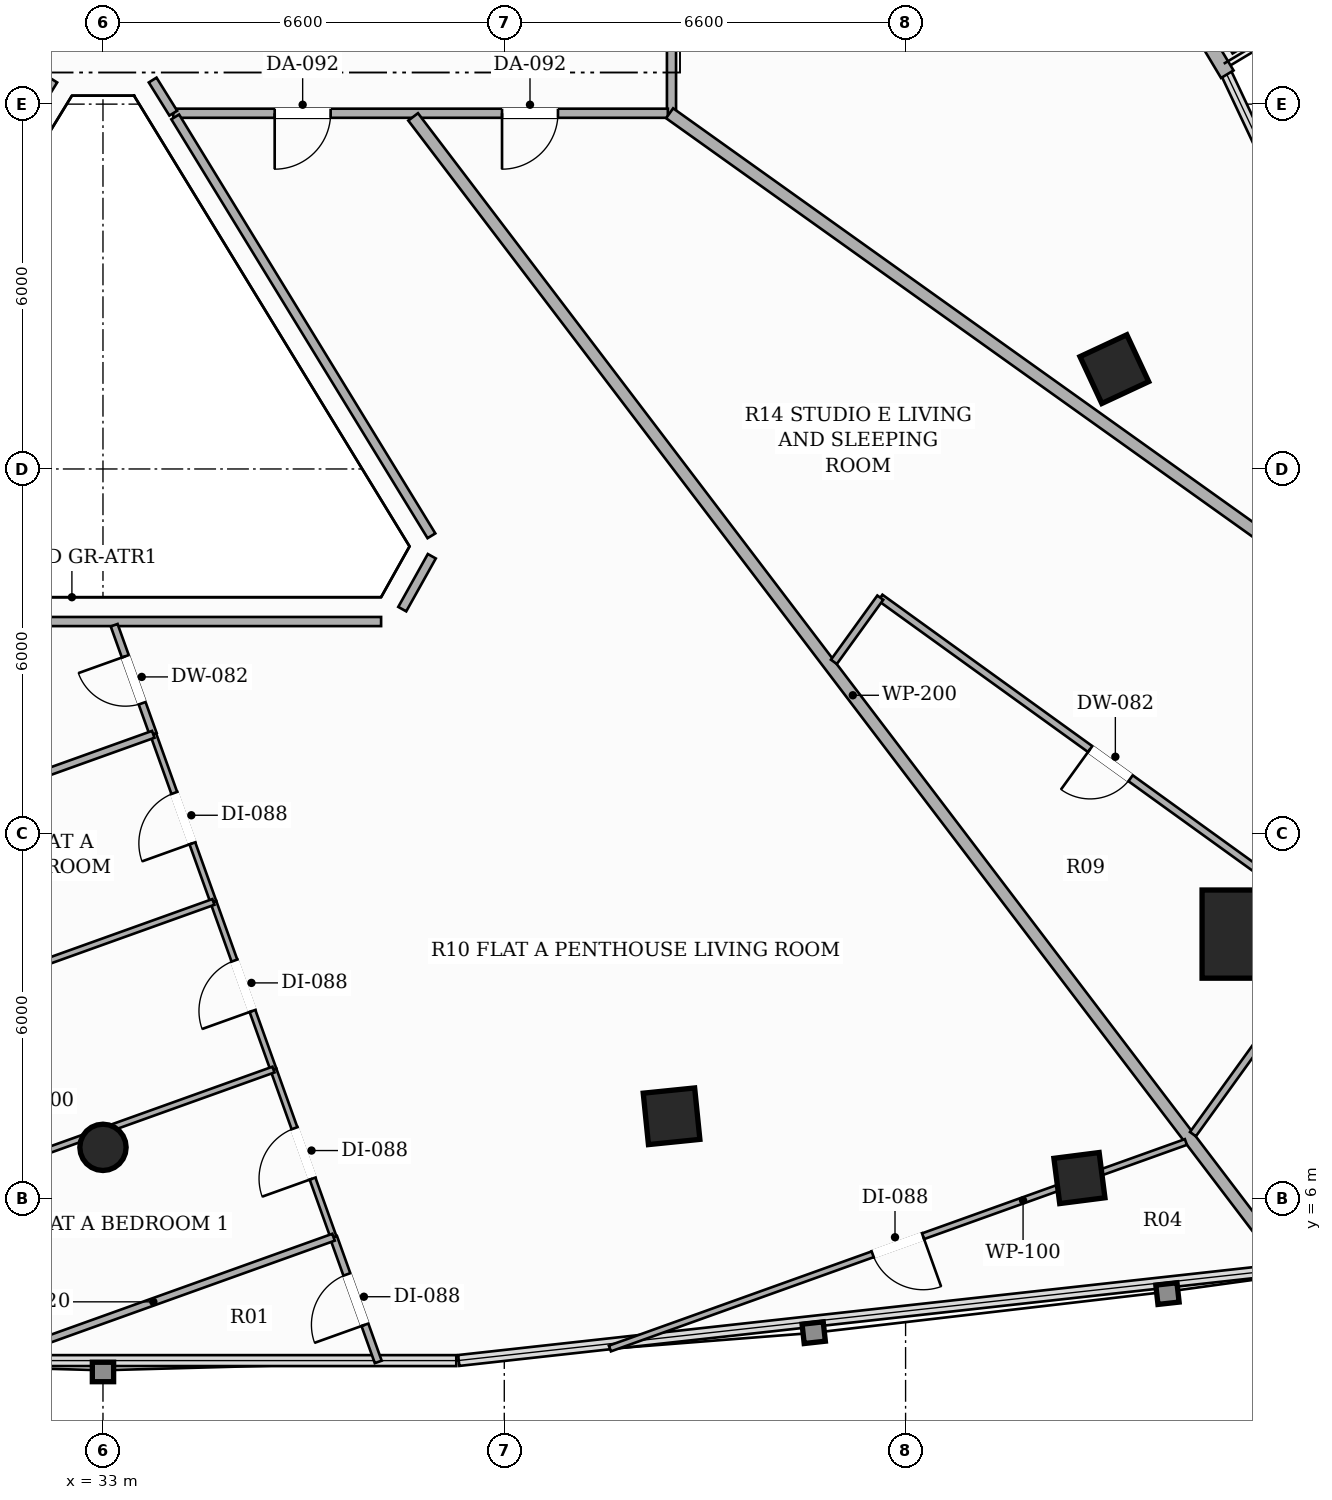
"""IFC4 building model, lengths in metres.
Left out: names, types, materials, properties, quantities, classifications, styles, units other than length and angle.
Written with IfcOpenShell. Run it as: python <this file> out.ifc"""

import sys

from ifc_helpers import new_model, si_unit, direction, frame, frame_2d, origin, origin_2d, place, context, subcontext, project, spatial, rectangle, hollow_rectangle, hollow_circle, extrude, element, fill, save


model = new_model("IFC4")
c1 = context("Model", 3, precision=1e-05, world=origin(), true_north=direction((0.0, 1.0)))
c2 = subcontext(c1, "Body", "Model", "MODEL_VIEW")
j1 = project(units=[si_unit("LENGTHUNIT", "METRE"), si_unit("PLANEANGLEUNIT", "RADIAN")], contexts=[c1])
p1 = place(None, origin())
s1 = spatial("IfcSite", under=j1, at=p1, CompositionType="ELEMENT")
p2 = place(p1, origin())
s2 = spatial("IfcBuilding", under=s1, at=p2, CompositionType="ELEMENT")
p3 = place(p2, frame((0.0, 0.0, 139.7)))
s3 = spatial("IfcBuildingStorey", under=s2, at=p3, CompositionType="ELEMENT", Elevation=139.7)
p4 = place(p3, frame((51.801, 10.351, 0.0), z_axis=(0.0, 0.0, 1.0), x_axis=(1.0, 0.0, 0.0)))
e1 = element("IfcColumn", 1, at=p4, inside=s3, PredefinedType="COLUMN", context=c2, shape_type="SweptSolid", body=[
    extrude(hollow_rectangle(XDim=1.45, YDim=1.45, WallThickness=0.045, at=origin_2d()), origin(), (0.0, 0.0, 1.0), 3.3),
])
p5 = place(p3, frame((33.0, 6.844, 0.0), z_axis=(0.0, 0.0, 1.0), x_axis=(1.0, 0.0, 0.0)))
e2 = element("IfcColumn", 2, at=p5, inside=s3, PredefinedType="COLUMN", context=c2, shape_type="SweptSolid", body=[
    extrude(hollow_circle(Radius=0.381, WallThickness=0.022, at=origin_2d()), origin(), (0.0, 0.0, 1.0), 3.3),
])
for number, where, z_axis, x_axis in (
    (3, (42.351, 7.355, 0.0), (0.0, 0.0, 1.0), (0.995, 0.101, 0.0)),
    (4, (49.633, 19.642, 0.0), (0.0, 0.0, 1.0), (-0.423, 0.906, 0.0)),
):
    element("IfcColumn", number, at=place(p3, frame(where, z_axis=z_axis, x_axis=x_axis)), inside=s3, PredefinedType="COLUMN", context=c2, shape_type="SweptSolid", body=[
        extrude(hollow_rectangle(XDim=0.85, YDim=0.85, WallThickness=0.028, at=origin_2d()), origin(), (0.0, 0.0, 1.0), 3.3),
    ])
p6 = place(p3, frame((49.059, 6.339, 0.0), z_axis=(0.0, 0.0, 1.0), x_axis=(0.99189444259, 0.127064608601, 0.0)))
e5 = element("IfcColumn", 5, at=p6, inside=s3, PredefinedType="COLUMN", context=c2, shape_type="SweptSolid", body=[
    extrude(hollow_rectangle(XDim=0.75, YDim=0.75, WallThickness=0.025, at=origin_2d()), origin(), (0.0, 0.0, 1.0), 3.3),
])
p7 = place(p3, frame((51.491, 24.492, 0.0), z_axis=(0.0, 0.0, 1.0), x_axis=(-0.514364263751, 0.857571807009, 0.0)))
e6 = element("IfcWall", 6, at=p7, inside=s3, PredefinedType="SOLIDWALL", context=c2, shape_type="SweptSolid", body=[
    extrude(rectangle(XDim=11.468, YDim=0.24, at=frame_2d((5.734, 0.0))), origin(), (0.0, 0.0, 1.0), 2.624),
])
p8 = place(p7, frame((8.972, 0.0, 0.0)))
e7 = element("IfcOpeningElement", 7, at=p8, cuts=e6, PredefinedType="OPENING", context=c2, shape_type="SweptSolid", body=[
    extrude(rectangle(XDim=1.8, YDim=2.2, at=frame_2d((0.9, 1.1))), frame((0.0, 0.13, 0.0), z_axis=(0.0, -1.0, 0.0), x_axis=(1.0, 0.0, 0.0)), (0.0, 0.0, 1.0), 0.26),
])
p9 = place(p3, frame((32.183, 24.396, 0.0), z_axis=(0.0, 0.0, 1.0), x_axis=(-0.527674894897, -0.849446411079, 0.0)))
e8 = element("IfcWall", 8, at=p9, inside=s3, PredefinedType="PARTITIONING", context=c2, shape_type="SweptSolid", body=[
    extrude(rectangle(XDim=0.643, YDim=0.15, at=frame_2d((0.321, 0.0))), origin(), (0.0, 0.0, 1.0), 3.06),
])
p10 = place(p3, frame((42.35, 28.34, 0.0), z_axis=(0.0, 0.0, 1.0), x_axis=(0.0, -1.0, 0.0)))
e9 = element("IfcWall", 9, at=p10, inside=s3, PredefinedType="PARTITIONING", context=c2, shape_type="SweptSolid", body=[
    extrude(rectangle(XDim=4.49, YDim=0.15, at=frame_2d((2.245, 0.0))), origin(), (0.0, 0.0, 1.0), 2.721),
])
p11 = place(p10, frame((1.805, 0.0, 0.0)))
e10 = element("IfcOpeningElement", 10, at=p11, cuts=e9, PredefinedType="OPENING", context=c2, shape_type="SweptSolid", body=[
    extrude(rectangle(XDim=0.88, YDim=2.1, at=frame_2d((0.44, 1.05))), frame((0.0, 0.085, 0.0), z_axis=(0.0, -1.0, 0.0), x_axis=(1.0, 0.0, 0.0)), (0.0, 0.0, 1.0), 0.17),
])
p12 = place(p3, frame((42.29, 23.85, 0.0), z_axis=(0.0, 0.0, 1.0), x_axis=(-1.0, 0.0, 0.0)))
e11 = element("IfcWall", 11, at=p12, inside=s3, PredefinedType="PARTITIONING", context=c2, shape_type="SweptSolid", body=[
    extrude(rectangle(XDim=8.134, YDim=0.15, at=frame_2d((4.067, 0.0))), origin(), (0.0, 0.0, 1.0), 2.492),
])
p13 = place(p12, frame((5.546, 0.0, 0.0)))
e12 = element("IfcOpeningElement", 12, at=p13, cuts=e11, PredefinedType="OPENING", context=c2, shape_type="SweptSolid", body=[
    extrude(rectangle(XDim=0.92, YDim=2.15, at=frame_2d((0.46, 1.075))), frame((0.0, 0.085, 0.0), z_axis=(0.0, -1.0, 0.0), x_axis=(1.0, 0.0, 0.0)), (0.0, 0.0, 1.0), 0.17),
])
p14 = place(p12, frame((1.807, 0.0, 0.0)))
e13 = element("IfcOpeningElement", 13, at=p14, cuts=e11, PredefinedType="OPENING", context=c2, shape_type="SweptSolid", body=[
    extrude(rectangle(XDim=0.92, YDim=2.15, at=frame_2d((0.46, 1.075))), frame((0.0, 0.085, 0.0), z_axis=(0.0, -1.0, 0.0), x_axis=(1.0, 0.0, 0.0)), (0.0, 0.0, 1.0), 0.17),
])
p15 = place(p3, frame((34.156, 23.851, 0.0), z_axis=(0.0, 0.0, 1.0), x_axis=(-0.528356729584, 0.849022476913, 0.0)))
e14 = element("IfcWall", 14, at=p15, inside=s3, PredefinedType="PARTITIONING", context=c2, shape_type="SweptSolid", body=[
    extrude(rectangle(XDim=0.642, YDim=0.15, at=frame_2d((0.321, 0.0))), origin(), (0.0, 0.0, 1.0), 3.06),
])
p16 = place(p3, frame((34.188, 23.79, 0.0), z_axis=(0.0, 0.0, 1.0), x_axis=(0.521816809014, -0.853057570057, 0.0)))
e15 = element("IfcWall", 15, at=p16, inside=s3, PredefinedType="PARTITIONING", context=c2, shape_type="SweptSolid", body=[
    extrude(rectangle(XDim=8.076, YDim=0.15, at=frame_2d((4.038, 0.0))), origin(), (0.0, 0.0, 1.0), 2.721),
])
p17 = place(p3, frame((38.408, 16.565, 0.0), z_axis=(0.0, 0.0, 1.0), x_axis=(-0.48761814532, -0.873057010942, 0.0)))
e16 = element("IfcWall", 16, at=p17, inside=s3, PredefinedType="PARTITIONING", context=c2, shape_type="SweptSolid", body=[
    extrude(rectangle(XDim=0.996, YDim=0.15, at=frame_2d((0.498, 0.0))), origin(), (0.0, 0.0, 1.0), 3.06),
])
p18 = place(p3, frame((37.574, 15.491, 0.0), z_axis=(0.0, 0.0, 1.0), x_axis=(-1.0, 0.0, 0.0)))
e17 = element("IfcWall", 17, at=p18, inside=s3, PredefinedType="PARTITIONING", context=c2, shape_type="SweptSolid", body=[
    extrude(rectangle(XDim=9.148, YDim=0.15, at=frame_2d((4.574, 0.0))), origin(), (0.0, 0.0, 1.0), 2.721),
])
p19 = place(p3, frame((38.101, 23.79, 0.0), z_axis=(0.0, 0.0, 1.0), x_axis=(0.605201904092, -0.796072016393, 0.0)))
e18 = element("IfcWall", 18, at=p19, inside=s3, PredefinedType="PARTITIONING", context=c2, shape_type="SweptSolid", body=[
    extrude(rectangle(XDim=23.896, YDim=0.2, at=frame_2d((11.948, 0.0))), origin(), (0.0, 0.0, 1.0), 2.413),
])
p20 = place(p3, frame((56.515, 13.72, 0.0), z_axis=(0.0, 0.0, 1.0), x_axis=(-0.813997291107, 0.580868668522, 0.0)))
e19 = element("IfcWall", 19, at=p20, inside=s3, PredefinedType="PARTITIONING", context=c2, shape_type="SweptSolid", body=[
    extrude(rectangle(XDim=17.44, YDim=0.2, at=frame_2d((8.72, 0.0))), origin(), (0.0, 0.0, 1.0), 2.413),
])
p21 = place(p3, frame((33.827, 13.636, 0.0), z_axis=(0.0, 0.0, 1.0), x_axis=(-0.337163686904, 0.941446041063, 0.0)))
e20 = element("IfcWall", 20, at=p21, inside=s3, PredefinedType="PARTITIONING", context=c2, shape_type="SweptSolid", body=[
    extrude(rectangle(XDim=1.906, YDim=0.12, at=frame_2d((0.953, 0.0))), origin(), (0.0, 0.0, 1.0), 2.721),
])
p22 = place(p21, frame((0.543, 0.0, 0.0)))
e21 = element("IfcOpeningElement", 21, at=p22, cuts=e20, PredefinedType="OPENING", context=c2, shape_type="SweptSolid", body=[
    extrude(rectangle(XDim=0.82, YDim=2.1, at=frame_2d((0.41, 1.05))), frame((0.0, 0.07, 0.0), z_axis=(0.0, -1.0, 0.0), x_axis=(1.0, 0.0, 0.0)), (0.0, 0.0, 1.0), 0.14),
])
p23 = place(p3, frame((37.527, 3.315, 0.0), z_axis=(0.0, 0.0, 1.0), x_axis=(-0.337393850622, 0.9413635799, 0.0)))
e22 = element("IfcWall", 22, at=p23, inside=s3, PredefinedType="PARTITIONING", context=c2, shape_type="SweptSolid", body=[
    extrude(rectangle(XDim=2.179, YDim=0.12, at=frame_2d((1.089, 0.0))), origin(), (0.0, 0.0, 1.0), 3.06),
])
p24 = place(p23, frame((0.649, 0.0, 0.0)))
e23 = element("IfcOpeningElement", 23, at=p24, cuts=e22, PredefinedType="OPENING", context=c2, shape_type="SweptSolid", body=[
    extrude(rectangle(XDim=0.88, YDim=2.1, at=frame_2d((0.44, 1.05))), frame((0.0, 0.07, 0.0), z_axis=(0.0, -1.0, 0.0), x_axis=(1.0, 0.0, 0.0)), (0.0, 0.0, 1.0), 0.14),
])
p25 = place(p3, frame((36.792, 5.366, 0.0), z_axis=(0.0, 0.0, 1.0), x_axis=(-0.33735537207, 0.941377370099, 0.0)))
e24 = element("IfcWall", 24, at=p25, inside=s3, PredefinedType="PARTITIONING", context=c2, shape_type="SweptSolid", body=[
    extrude(rectangle(XDim=2.929, YDim=0.1, at=frame_2d((1.464, 0.0))), origin(), (0.0, 0.0, 1.0), 2.413),
])
p26 = place(p25, frame((1.024, 0.0, 0.0)))
e25 = element("IfcOpeningElement", 25, at=p26, cuts=e24, PredefinedType="OPENING", context=c2, shape_type="SweptSolid", body=[
    extrude(rectangle(XDim=0.88, YDim=2.1, at=frame_2d((0.44, 1.05))), frame((0.0, 0.06, 0.0), z_axis=(0.0, -1.0, 0.0), x_axis=(1.0, 0.0, 0.0)), (0.0, 0.0, 1.0), 0.12),
])
p27 = place(p3, frame((50.81, 6.932, 0.0), z_axis=(0.0, 0.0, 1.0), x_axis=(-0.941340567411, -0.337458050943, 0.0)))
e26 = element("IfcWall", 26, at=p27, inside=s3, PredefinedType="PARTITIONING", context=c2, shape_type="SweptSolid", body=[
    extrude(rectangle(XDim=10.063, YDim=0.1, at=frame_2d((5.032, 0.0))), origin(), (0.0, 0.0, 1.0), 2.413),
])
p28 = place(p27, frame((4.592, 0.0, 0.0)))
e27 = element("IfcOpeningElement", 27, at=p28, cuts=e26, PredefinedType="OPENING", context=c2, shape_type="SweptSolid", body=[
    extrude(rectangle(XDim=0.88, YDim=2.1, at=frame_2d((0.44, 1.05))), frame((0.0, 0.06, 0.0), z_axis=(0.0, -1.0, 0.0), x_axis=(1.0, 0.0, 0.0)), (0.0, 0.0, 1.0), 0.12),
])
p29 = place(p3, frame((35.804, 8.123, 0.0), z_axis=(0.0, 0.0, 1.0), x_axis=(-0.337381847176, 0.941367881965, 0.0)))
e28 = element("IfcWall", 28, at=p29, inside=s3, PredefinedType="PARTITIONING", context=c2, shape_type="SweptSolid", body=[
    extrude(rectangle(XDim=2.928, YDim=0.1, at=frame_2d((1.464, 0.0))), origin(), (0.0, 0.0, 1.0), 3.06),
])
p30 = place(p29, frame((1.024, 0.0, 0.0)))
e29 = element("IfcOpeningElement", 29, at=p30, cuts=e28, PredefinedType="OPENING", context=c2, shape_type="SweptSolid", body=[
    extrude(rectangle(XDim=0.88, YDim=2.1, at=frame_2d((0.44, 1.05))), frame((0.0, 0.06, 0.0), z_axis=(0.0, -1.0, 0.0), x_axis=(1.0, 0.0, 0.0)), (0.0, 0.0, 1.0), 0.12),
])
p31 = place(p3, frame((34.816, 10.88, 0.0), z_axis=(0.0, 0.0, 1.0), x_axis=(-0.337756804272, 0.941233414817, 0.0)))
e30 = element("IfcWall", 30, at=p31, inside=s3, PredefinedType="PARTITIONING", context=c2, shape_type="SweptSolid", body=[
    extrude(rectangle(XDim=2.928, YDim=0.1, at=frame_2d((1.464, 0.0))), origin(), (0.0, 0.0, 1.0), 3.06),
])
p32 = place(p31, frame((1.024, 0.0, 0.0)))
e31 = element("IfcOpeningElement", 31, at=p32, cuts=e30, PredefinedType="OPENING", context=c2, shape_type="SweptSolid", body=[
    extrude(rectangle(XDim=0.88, YDim=2.1, at=frame_2d((0.44, 1.05))), frame((0.0, 0.06, 0.0), z_axis=(0.0, -1.0, 0.0), x_axis=(1.0, 0.0, 0.0)), (0.0, 0.0, 1.0), 0.12),
])
p33 = place(p3, frame((33.827, 13.636, 0.0), z_axis=(0.0, 0.0, 1.0), x_axis=(-0.941307932725, -0.337549071676, 0.0)))
e32 = element("IfcWall", 32, at=p33, inside=s3, PredefinedType="PARTITIONING", context=c2, shape_type="SweptSolid", body=[
    extrude(rectangle(XDim=4.743, YDim=0.12, at=frame_2d((2.372, 0.0))), origin(), (0.0, 0.0, 1.0), 2.721),
])
p34 = place(p3, frame((30.865, 3.241, 0.0), z_axis=(0.0, 0.0, 1.0), x_axis=(0.941328015911, 0.337493061354, 0.0)))
e33 = element("IfcWall", 33, at=p34, inside=s3, PredefinedType="PARTITIONING", context=c2, shape_type="SweptSolid", body=[
    extrude(rectangle(XDim=6.296, YDim=0.12, at=frame_2d((3.148, 0.0))), origin(), (0.0, 0.0, 1.0), 2.619),
])
p35 = place(p3, frame((28.008, 5.328, 0.0), z_axis=(0.0, 0.0, 1.0), x_axis=(0.941323677897, 0.337505160599, 0.0)))
e34 = element("IfcWall", 34, at=p35, inside=s3, PredefinedType="PARTITIONING", context=c2, shape_type="SweptSolid", body=[
    extrude(rectangle(XDim=8.282, YDim=0.1, at=frame_2d((4.141, 0.0))), origin(), (0.0, 0.0, 1.0), 2.413),
])
p36 = place(p3, frame((28.685, 8.682, 0.0), z_axis=(0.0, 0.0, 1.0), x_axis=(0.94133243901, 0.337480724291, 0.0)))
e35 = element("IfcWall", 35, at=p36, inside=s3, PredefinedType="PARTITIONING", context=c2, shape_type="SweptSolid", body=[
    extrude(rectangle(XDim=6.513, YDim=0.1, at=frame_2d((3.256, 0.0))), origin(), (0.0, 0.0, 1.0), 2.721),
])
p37 = place(p3, frame((53.352, 10.424, 0.0), z_axis=(0.0, 0.0, 1.0), x_axis=(-0.810979209295, 0.585074971343, 0.0)))
e36 = element("IfcWall", 36, at=p37, inside=s3, PredefinedType="PARTITIONING", context=c2, shape_type="SweptSolid", body=[
    extrude(rectangle(XDim=9.332, YDim=0.12, at=frame_2d((4.666, 0.0))), origin(), (0.0, 0.0, 1.0), 2.413),
])
p38 = place(p37, frame((4.256, 0.0, 0.0)))
e37 = element("IfcOpeningElement", 37, at=p38, cuts=e36, PredefinedType="OPENING", context=c2, shape_type="SweptSolid", body=[
    extrude(rectangle(XDim=0.82, YDim=2.1, at=frame_2d((0.41, 1.05))), frame((0.0, 0.07, 0.0), z_axis=(0.0, -1.0, 0.0), x_axis=(1.0, 0.0, 0.0)), (0.0, 0.0, 1.0), 0.14),
])
p39 = place(p3, frame((45.784, 15.884, 0.0), z_axis=(0.0, 0.0, 1.0), x_axis=(-0.58557264979, -0.810619930558, 0.0)))
e38 = element("IfcWall", 38, at=p39, inside=s3, PredefinedType="PARTITIONING", context=c2, shape_type="SweptSolid", body=[
    extrude(rectangle(XDim=1.303, YDim=0.12, at=frame_2d((0.651, 0.0))), origin(), (0.0, 0.0, 1.0), 2.721),
])
p40 = place(p3, frame((53.352, 10.424, 0.0), z_axis=(0.0, 0.0, 1.0), x_axis=(-0.585041198475, -0.811003573412, 0.0)))
e39 = element("IfcWall", 39, at=p40, inside=s3, PredefinedType="PARTITIONING", context=c2, shape_type="SweptSolid", body=[
    extrude(rectangle(XDim=4.147, YDim=0.12, at=frame_2d((2.073, 0.0))), origin(), (0.0, 0.0, 1.0), 2.619),
])
p41 = place(p13, origin())
e40 = element("IfcDoor", 40, at=p41, inside=s3, OperationType="SINGLE_SWING_RIGHT", PredefinedType="DOOR", context=c2, shape_type="SweptSolid", body=[
    extrude(rectangle(XDim=0.92, YDim=2.15, at=frame_2d((0.46, 1.075))), frame((0.0, 0.025, 0.0), z_axis=(0.0, -1.0, 0.0), x_axis=(1.0, 0.0, 0.0)), (0.0, 0.0, 1.0), 0.05),
])
fill(e12, e40)
p42 = place(p22, origin())
e41 = element("IfcDoor", 41, at=p42, inside=s3, OperationType="SINGLE_SWING_RIGHT", PredefinedType="DOOR", context=c2, shape_type="SweptSolid", body=[
    extrude(rectangle(XDim=0.82, YDim=2.1, at=frame_2d((0.41, 1.05))), frame((0.0, 0.025, 0.0), z_axis=(0.0, -1.0, 0.0), x_axis=(1.0, 0.0, 0.0)), (0.0, 0.0, 1.0), 0.05),
])
fill(e21, e41)
p43 = place(p24, origin())
e42 = element("IfcDoor", 42, at=p43, inside=s3, OperationType="SINGLE_SWING_LEFT", PredefinedType="DOOR", context=c2, shape_type="SweptSolid", body=[
    extrude(rectangle(XDim=0.88, YDim=2.1, at=frame_2d((0.44, 1.05))), frame((0.0, 0.025, 0.0), z_axis=(0.0, -1.0, 0.0), x_axis=(1.0, 0.0, 0.0)), (0.0, 0.0, 1.0), 0.05),
])
fill(e23, e42)
p44 = place(p26, origin())
e43 = element("IfcDoor", 43, at=p44, inside=s3, OperationType="SINGLE_SWING_LEFT", PredefinedType="DOOR", context=c2, shape_type="SweptSolid", body=[
    extrude(rectangle(XDim=0.88, YDim=2.1, at=frame_2d((0.44, 1.05))), frame((0.0, 0.025, 0.0), z_axis=(0.0, -1.0, 0.0), x_axis=(1.0, 0.0, 0.0)), (0.0, 0.0, 1.0), 0.05),
])
fill(e25, e43)
p45 = place(p28, origin())
e44 = element("IfcDoor", 44, at=p45, inside=s3, OperationType="SINGLE_SWING_LEFT", PredefinedType="DOOR", context=c2, shape_type="SweptSolid", body=[
    extrude(rectangle(XDim=0.88, YDim=2.1, at=frame_2d((0.44, 1.05))), frame((0.0, 0.025, 0.0), z_axis=(0.0, -1.0, 0.0), x_axis=(1.0, 0.0, 0.0)), (0.0, 0.0, 1.0), 0.05),
])
fill(e27, e44)
p46 = place(p30, origin())
e45 = element("IfcDoor", 45, at=p46, inside=s3, OperationType="SINGLE_SWING_LEFT", PredefinedType="DOOR", context=c2, shape_type="SweptSolid", body=[
    extrude(rectangle(XDim=0.88, YDim=2.1, at=frame_2d((0.44, 1.05))), frame((0.0, 0.025, 0.0), z_axis=(0.0, -1.0, 0.0), x_axis=(1.0, 0.0, 0.0)), (0.0, 0.0, 1.0), 0.05),
])
fill(e29, e45)
p47 = place(p32, origin())
e46 = element("IfcDoor", 46, at=p47, inside=s3, OperationType="SINGLE_SWING_LEFT", PredefinedType="DOOR", context=c2, shape_type="SweptSolid", body=[
    extrude(rectangle(XDim=0.88, YDim=2.1, at=frame_2d((0.44, 1.05))), frame((0.0, 0.025, 0.0), z_axis=(0.0, -1.0, 0.0), x_axis=(1.0, 0.0, 0.0)), (0.0, 0.0, 1.0), 0.05),
])
fill(e31, e46)
p48 = place(p14, origin())
e47 = element("IfcDoor", 47, at=p48, inside=s3, OperationType="SINGLE_SWING_RIGHT", PredefinedType="DOOR", context=c2, shape_type="SweptSolid", body=[
    extrude(rectangle(XDim=0.92, YDim=2.15, at=frame_2d((0.46, 1.075))), frame((0.0, 0.025, 0.0), z_axis=(0.0, -1.0, 0.0), x_axis=(1.0, 0.0, 0.0)), (0.0, 0.0, 1.0), 0.05),
])
fill(e13, e47)
p49 = place(p38, origin())
e48 = element("IfcDoor", 48, at=p49, inside=s3, OperationType="SINGLE_SWING_RIGHT", PredefinedType="DOOR", context=c2, shape_type="SweptSolid", body=[
    extrude(rectangle(XDim=0.82, YDim=2.1, at=frame_2d((0.41, 1.05))), frame((0.0, 0.025, 0.0), z_axis=(0.0, -1.0, 0.0), x_axis=(1.0, 0.0, 0.0)), (0.0, 0.0, 1.0), 0.05),
])
fill(e37, e48)
save(model, sys.argv[1])
